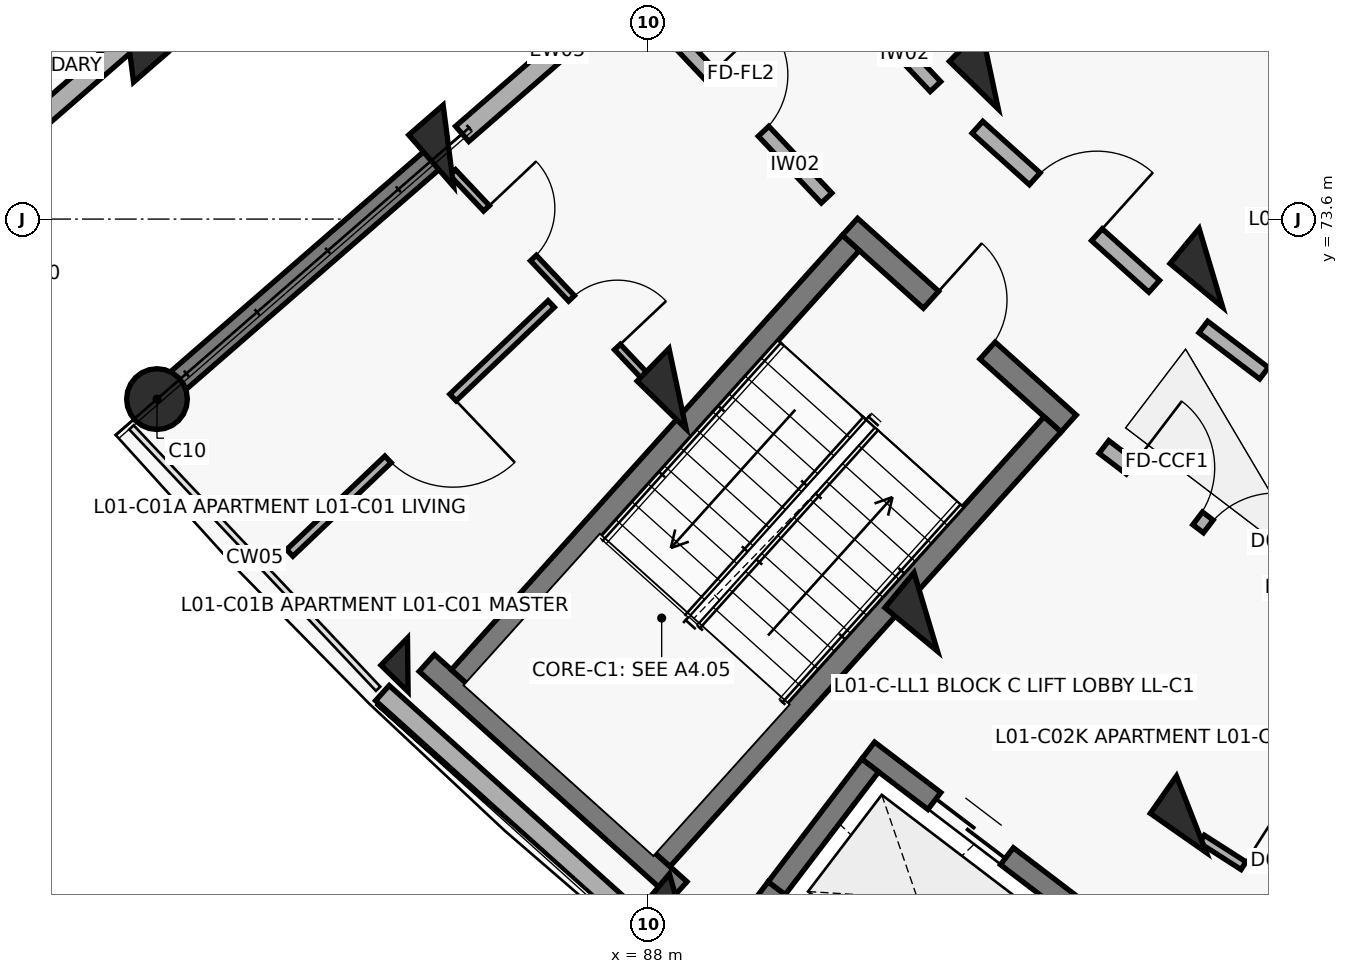
"""IFC4 building model, lengths in metres.
Left out: names, types, materials, properties, quantities, classifications, styles, units other than length and angle.
Written with IfcOpenShell. Run it as: python <this file> out.ifc"""

import sys

from ifc_helpers import new_model, si_unit, direction, frame, frame_2d, origin, origin_2d, place, context, subcontext, project, spatial, rectangle, circle, extrude, element, fill, save


model = new_model("IFC4")
c1 = context("Model", 3, precision=1e-05, world=origin(), true_north=direction((0.0, 1.0)))
c2 = subcontext(c1, "Body", "Model", "MODEL_VIEW")
j1 = project(units=[si_unit("LENGTHUNIT", "METRE"), si_unit("PLANEANGLEUNIT", "RADIAN")], contexts=[c1])
p1 = place(None, origin())
s1 = spatial("IfcSite", under=j1, at=p1, CompositionType="ELEMENT")
p2 = place(p1, origin())
s2 = spatial("IfcBuilding", under=s1, at=p2, CompositionType="ELEMENT")
p3 = place(p2, frame((0.0, 0.0, 4.5)))
s3 = spatial("IfcBuildingStorey", under=s2, at=p3, CompositionType="ELEMENT", Elevation=4.5)
for number, where, z_axis, x_axis in (
    (1, (81.166, 75.938, 0.0), (0.0, 0.0, 1.0), (0.755, 0.656, 0.0)),
    (2, (85.377, 74.564, 0.0), (0.0, 0.0, 1.0), (-0.755, -0.656, 0.0)),
):
    element("IfcColumn", number, at=place(p3, frame(where, z_axis=z_axis, x_axis=x_axis)), inside=s3, PredefinedType="COLUMN", context=c2, shape_type="SweptSolid", body=[
        extrude(rectangle(XDim=0.6, YDim=0.9, at=origin_2d()), origin(), (0.0, 0.0, 1.0), 3.6),
    ])
p4 = place(p3, frame((81.543, 71.231, 0.0), z_axis=(0.0, 0.0, 1.0), x_axis=(-0.754709580223, -0.656059028991, 0.0)))
e3 = element("IfcColumn", 3, at=p4, inside=s3, PredefinedType="COLUMN", context=c2, shape_type="SweptSolid", body=[
    extrude(circle(Radius=0.4, at=origin_2d()), origin(), (0.0, 0.0, 1.0), 3.6),
])
for number, where, z_axis, x_axis in (
    (4, (92.5, 75.576, 0.0), (0.0, 0.0, 1.0), (-0.699, -0.715, 0.0)),
    (5, (88.392, 71.369, 0.0), (0.0, 0.0, 1.0), (-0.699, -0.715, 0.0)),
):
    element("IfcColumn", number, at=place(p3, frame(where, z_axis=z_axis, x_axis=x_axis)), inside=s3, PredefinedType="COLUMN", context=c2, shape_type="SweptSolid", body=[
        extrude(rectangle(XDim=0.6, YDim=0.9, at=origin_2d()), origin(), (0.0, 0.0, 1.0), 3.6),
    ])
p5 = place(p3, frame((84.843, 67.734, 0.0), z_axis=(0.0, 0.0, 1.0), x_axis=(-0.698665066769, -0.715448897181, 0.0)))
e6 = element("IfcColumn", 6, at=p5, inside=s3, PredefinedType="COLUMN", context=c2, shape_type="SweptSolid", body=[
    extrude(rectangle(XDim=0.5, YDim=0.5, at=origin_2d()), origin(), (0.0, 0.0, 1.0), 3.6),
])
for number, where, z_axis, x_axis in (
    (7, (95.409, 72.958, 0.0), (0.0, 0.0, 1.0), (-0.638, -0.77, 0.0)),
    (8, (91.658, 68.43, 0.0), (0.0, 0.0, 1.0), (-0.638, -0.77, 0.0)),
):
    element("IfcColumn", number, at=place(p3, frame(where, z_axis=z_axis, x_axis=x_axis)), inside=s3, PredefinedType="COLUMN", context=c2, shape_type="SweptSolid", body=[
        extrude(rectangle(XDim=0.6, YDim=0.9, at=origin_2d()), origin(), (0.0, 0.0, 1.0), 3.6),
    ])
p6 = place(p3, frame((88.417, 64.518, 0.0), z_axis=(0.0, 0.0, 1.0), x_axis=(-0.637961754089, -0.770068049148, 0.0)))
e9 = element("IfcColumn", 9, at=p6, inside=s3, PredefinedType="COLUMN", context=c2, shape_type="SweptSolid", body=[
    extrude(rectangle(XDim=0.55, YDim=0.8, at=origin_2d()), origin(), (0.0, 0.0, 1.0), 3.6),
])
p7 = place(p3, frame((95.152, 65.768, 0.0), z_axis=(0.0, 0.0, 1.0), x_axis=(-0.573004420611, -0.819552276527, 0.0)))
e10 = element("IfcColumn", 10, at=p7, inside=s3, PredefinedType="COLUMN", context=c2, shape_type="SweptSolid", body=[
    extrude(rectangle(XDim=0.6, YDim=0.9, at=origin_2d()), origin(), (0.0, 0.0, 1.0), 3.6),
])
p8 = place(p3, frame((85.241, 74.446, 0.0), z_axis=(0.0, 0.0, 1.0), x_axis=(-0.754703505217, -0.65606601742, 0.0)))
e11 = element("IfcWall", 11, at=p8, inside=s3, PredefinedType="SHEAR", context=c2, shape_type="SweptSolid", body=[
    extrude(rectangle(XDim=4.72, YDim=0.31, at=frame_2d((2.36, 0.0))), origin(), (0.0, 0.0, 1.0), 3.36),
])
p9 = place(p3, frame((79.234, 74.259, 0.0), z_axis=(0.0, 0.0, 1.0), x_axis=(0.754717680958, 0.656049710044, 0.0)))
e12 = element("IfcWall", 12, at=p9, inside=s3, PredefinedType="SOLIDWALL", context=c2, shape_type="SweptSolid", body=[
    extrude(rectangle(XDim=8.2, YDim=0.265, at=frame_2d((4.1, 0.0))), origin(), (0.0, 0.0, 1.0), 2.58),
])
p10 = place(p9, frame((3.59, 0.0, 0.75)))
e13 = element("IfcOpeningElement", 13, at=p10, cuts=e12, PredefinedType="OPENING", context=c2, shape_type="SweptSolid", body=[
    extrude(rectangle(XDim=1.35, YDim=1.35, at=frame_2d((0.675, 0.675))), frame((0.0, 0.142, 0.0), z_axis=(0.0, -1.0, 0.0), x_axis=(1.0, 0.0, 0.0)), (0.0, 0.0, 1.0), 0.285),
])
p11 = place(p3, frame((84.508, 67.363, 0.0), z_axis=(0.0, 0.0, 1.0), x_axis=(0.743387539862, -0.668860946369, 0.0)))
e14 = element("IfcWall", 14, at=p11, inside=s3, PredefinedType="SOLIDWALL", context=c2, shape_type="SweptSolid", body=[
    extrude(rectangle(XDim=4.809, YDim=0.268, at=frame_2d((2.405, 0.0))), origin(), (0.0, 0.0, 1.0), 2.6),
])
p12 = place(p3, frame((94.82, 77.923, 0.0), z_axis=(0.0, 0.0, 1.0), x_axis=(0.743385092197, -0.668863666751, 0.0)))
e15 = element("IfcWall", 15, at=p12, inside=s3, PredefinedType="SOLIDWALL", context=c2, shape_type="SweptSolid", body=[
    extrude(rectangle(XDim=3.604, YDim=0.245, at=frame_2d((1.802, 0.0))), origin(), (0.0, 0.0, 1.0), 2.6),
])
p13 = place(p12, frame((0.752, 0.0, 0.32)))
e16 = element("IfcOpeningElement", 16, at=p13, cuts=e15, PredefinedType="OPENING", context=c2, shape_type="SweptSolid", body=[
    extrude(rectangle(XDim=2.1, YDim=1.65, at=frame_2d((1.05, 0.825))), frame((0.0, 0.133, 0.0), z_axis=(0.0, -1.0, 0.0), x_axis=(1.0, 0.0, 0.0)), (0.0, 0.0, 1.0), 0.265),
])
p14 = place(p3, frame((91.746, 80.101, 0.0), z_axis=(0.0, 0.0, 1.0), x_axis=(-0.754704866158, -0.656064451862, 0.0)))
e17 = element("IfcWall", 17, at=p14, inside=s3, PredefinedType="SOLIDWALL", context=c2, shape_type="SweptSolid", body=[
    extrude(rectangle(XDim=8.2, YDim=0.265, at=frame_2d((4.1, 0.0))), origin(), (0.0, 0.0, 1.0), 2.58),
])
p15 = place(p14, frame((3.59, 0.0, 0.75)))
e18 = element("IfcOpeningElement", 18, at=p15, cuts=e17, PredefinedType="OPENING", context=c2, shape_type="SweptSolid", body=[
    extrude(rectangle(XDim=1.35, YDim=1.35, at=frame_2d((0.675, 0.675))), frame((0.0, 0.142, 0.0), z_axis=(0.0, -1.0, 0.0), x_axis=(1.0, 0.0, 0.0)), (0.0, 0.0, 1.0), 0.285),
])
p16 = place(p3, frame((90.66, 73.499, 0.0), z_axis=(0.0, 0.0, 1.0), x_axis=(0.743375696158, -0.668874109501, 0.0)))
e19 = element("IfcWall", 19, at=p16, inside=s3, PredefinedType="SHEAR", context=c2, shape_type="SweptSolid", body=[
    extrude(rectangle(XDim=3.87, YDim=0.3, at=frame_2d((1.935, 0.0))), origin(), (0.0, 0.0, 1.0), 3.6),
])
p17 = place(p16, frame((1.435, 0.0, 0.0)))
e20 = element("IfcOpeningElement", 20, at=p17, cuts=e19, PredefinedType="OPENING", context=c2, shape_type="SweptSolid", body=[
    extrude(rectangle(XDim=1.0, YDim=2.15, at=frame_2d((0.5, 1.075))), frame((0.0, 0.16, 0.0), z_axis=(0.0, -1.0, 0.0), x_axis=(1.0, 0.0, 0.0)), (0.0, 0.0, 1.0), 0.32),
])
p18 = place(p3, frame((85.093, 67.76, 0.0), z_axis=(0.0, 0.0, 1.0), x_axis=(0.743372896184, -0.668877221333, 0.0)))
e21 = element("IfcWall", 21, at=p18, inside=s3, PredefinedType="SHEAR", context=c2, shape_type="SweptSolid", body=[
    extrude(rectangle(XDim=4.47, YDim=0.3, at=frame_2d((2.235, 0.0))), origin(), (0.0, 0.0, 1.0), 3.6),
])
p19 = place(p3, frame((90.671, 73.287, 0.0), z_axis=(0.0, 0.0, 1.0), x_axis=(-0.668885797871, -0.743365179038, 0.0)))
e22 = element("IfcWall", 22, at=p19, inside=s3, PredefinedType="SHEAR", context=c2, shape_type="SweptSolid", body=[
    extrude(rectangle(XDim=7.69, YDim=0.3, at=frame_2d((3.845, 0.0))), origin(), (0.0, 0.0, 1.0), 3.6),
])
p20 = place(p3, frame((93.325, 70.899, 0.0), z_axis=(0.0, 0.0, 1.0), x_axis=(-0.668868253964, -0.743380964808, 0.0)))
e23 = element("IfcWall", 23, at=p20, inside=s3, PredefinedType="SHEAR", context=c2, shape_type="SweptSolid", body=[
    extrude(rectangle(XDim=7.69, YDim=0.3, at=frame_2d((3.845, 0.0))), origin(), (0.0, 0.0, 1.0), 3.6),
])
p21 = place(p3, frame((90.899, 66.607, 0.0), z_axis=(0.0, 0.0, 1.0), x_axis=(0.795439986025, -0.606032365994, 0.0)))
e24 = element("IfcWall", 24, at=p21, inside=s3, PredefinedType="SHEAR", context=c2, shape_type="SweptSolid", body=[
    extrude(rectangle(XDim=3.39, YDim=0.28, at=frame_2d((1.695, 0.0))), origin(), (0.0, 0.0, 1.0), 3.6),
])
p22 = place(p21, frame((1.095, 0.0, 0.0)))
e25 = element("IfcOpeningElement", 25, at=p22, cuts=e24, PredefinedType="OPENING", context=c2, shape_type="SweptSolid", body=[
    extrude(rectangle(XDim=1.2, YDim=2.15, at=frame_2d((0.6, 1.075))), frame((0.0, 0.15, 0.0), z_axis=(0.0, -1.0, 0.0), x_axis=(1.0, 0.0, 0.0)), (0.0, 0.0, 1.0), 0.3),
])
p23 = place(p3, frame((89.5, 64.77, 0.0), z_axis=(0.0, 0.0, 1.0), x_axis=(0.795474703455, -0.605986795371, 0.0)))
e26 = element("IfcWall", 26, at=p23, inside=s3, PredefinedType="SHEAR", context=c2, shape_type="SweptSolid", body=[
    extrude(rectangle(XDim=3.39, YDim=0.28, at=frame_2d((1.695, 0.0))), origin(), (0.0, 0.0, 1.0), 3.6),
])
p24 = place(p3, frame((90.926, 66.411, 0.0), z_axis=(0.0, 0.0, 1.0), x_axis=(-0.605948992168, -0.795503500238, 0.0)))
e27 = element("IfcWall", 27, at=p24, inside=s3, PredefinedType="SHEAR", context=c2, shape_type="SweptSolid", body=[
    extrude(rectangle(XDim=2.03, YDim=0.28, at=frame_2d((1.015, 0.0))), origin(), (0.0, 0.0, 1.0), 3.6),
])
p25 = place(p3, frame((87.994, 76.376, 0.0), z_axis=(0.0, 0.0, 1.0), x_axis=(0.686310507227, -0.727308660522, 0.0)))
e28 = element("IfcWall", 28, at=p25, inside=s3, PredefinedType="SOLIDWALL", context=c2, shape_type="SweptSolid", body=[
    extrude(rectangle(XDim=3.436, YDim=0.19, at=frame_2d((1.718, 0.0))), origin(), (0.0, 0.0, 1.0), 2.58),
])
p26 = place(p25, frame((1.208, 0.0, 0.0)))
e29 = element("IfcOpeningElement", 29, at=p26, cuts=e28, PredefinedType="OPENING", context=c2, shape_type="SweptSolid", body=[
    extrude(rectangle(XDim=1.02, YDim=2.15, at=frame_2d((0.51, 1.075))), frame((0.0, 0.105, 0.0), z_axis=(0.0, -1.0, 0.0), x_axis=(1.0, 0.0, 0.0)), (0.0, 0.0, 1.0), 0.21),
])
p27 = place(p3, frame((89.541, 77.721, 0.0), z_axis=(0.0, 0.0, 1.0), x_axis=(0.686344941052, -0.727276166179, 0.0)))
e30 = element("IfcWall", 30, at=p27, inside=s3, PredefinedType="SOLIDWALL", context=c2, shape_type="SweptSolid", body=[
    extrude(rectangle(XDim=3.269, YDim=0.19, at=frame_2d((1.634, 0.0))), origin(), (0.0, 0.0, 1.0), 2.58),
])
p28 = place(p27, frame((1.174, 0.0, 0.0)))
e31 = element("IfcOpeningElement", 31, at=p28, cuts=e30, PredefinedType="OPENING", context=c2, shape_type="SweptSolid", body=[
    extrude(rectangle(XDim=0.92, YDim=2.1, at=frame_2d((0.46, 1.05))), frame((0.0, 0.105, 0.0), z_axis=(0.0, -1.0, 0.0), x_axis=(1.0, 0.0, 0.0)), (0.0, 0.0, 1.0), 0.21),
])
p29 = place(p3, frame((85.432, 74.215, 0.0), z_axis=(0.0, 0.0, 1.0), x_axis=(0.686301674417, -0.727316995327, 0.0)))
e32 = element("IfcWall", 32, at=p29, inside=s3, PredefinedType="PARTITIONING", context=c2, shape_type="SweptSolid", body=[
    extrude(rectangle(XDim=3.81, YDim=0.105, at=frame_2d((1.905, 0.0))), origin(), (0.0, 0.0, 1.0), 2.58),
])
p30 = place(p29, frame((0.65, 0.0, 0.0)))
e33 = element("IfcOpeningElement", 33, at=p30, cuts=e32, PredefinedType="OPENING", context=c2, shape_type="SweptSolid", body=[
    extrude(rectangle(XDim=0.9, YDim=2.1, at=frame_2d((0.45, 1.05))), frame((0.0, 0.062, 0.0), z_axis=(0.0, -1.0, 0.0), x_axis=(1.0, 0.0, 0.0)), (0.0, 0.0, 1.0), 0.125),
])
p31 = place(p29, frame((2.28, 0.0, 0.0)))
e34 = element("IfcOpeningElement", 34, at=p31, cuts=e32, PredefinedType="OPENING", context=c2, shape_type="SweptSolid", body=[
    extrude(rectangle(XDim=0.88, YDim=2.1, at=frame_2d((0.44, 1.05))), frame((0.0, 0.062, 0.0), z_axis=(0.0, -1.0, 0.0), x_axis=(1.0, 0.0, 0.0)), (0.0, 0.0, 1.0), 0.125),
])
p32 = place(p3, frame((86.729, 72.483, 0.0), z_axis=(0.0, 0.0, 1.0), x_axis=(-0.72416604425, -0.689625652332, 0.0)))
e35 = element("IfcWall", 35, at=p32, inside=s3, PredefinedType="PARTITIONING", context=c2, shape_type="SweptSolid", body=[
    extrude(rectangle(XDim=4.75, YDim=0.12, at=frame_2d((2.375, 0.0))), origin(), (0.0, 0.0, 1.0), 2.58),
])
p33 = place(p32, frame((1.785, 0.0, 0.0)))
e36 = element("IfcOpeningElement", 36, at=p33, cuts=e35, PredefinedType="OPENING", context=c2, shape_type="SweptSolid", body=[
    extrude(rectangle(XDim=1.18, YDim=2.1, at=frame_2d((0.59, 1.05))), frame((0.0, 0.07, 0.0), z_axis=(0.0, -1.0, 0.0), x_axis=(1.0, 0.0, 0.0)), (0.0, 0.0, 1.0), 0.14),
])
p34 = place(p3, frame((92.337, 74.808, 0.0), z_axis=(0.0, 0.0, 1.0), x_axis=(0.743348465558, -0.668904371904, 0.0)))
e37 = element("IfcWall", 37, at=p34, inside=s3, PredefinedType="SOLIDWALL", context=c2, shape_type="SweptSolid", body=[
    extrude(rectangle(XDim=3.129, YDim=0.21, at=frame_2d((1.564, 0.0))), origin(), (0.0, 0.0, 1.0), 2.58),
])
p35 = place(p34, frame((1.014, 0.0, 0.0)))
e38 = element("IfcOpeningElement", 38, at=p35, cuts=e37, PredefinedType="OPENING", context=c2, shape_type="SweptSolid", body=[
    extrude(rectangle(XDim=1.1, YDim=2.15, at=frame_2d((0.55, 1.075))), frame((0.0, 0.115, 0.0), z_axis=(0.0, -1.0, 0.0), x_axis=(1.0, 0.0, 0.0)), (0.0, 0.0, 1.0), 0.23),
])
p36 = place(p3, frame((94.001, 70.602, 0.0), z_axis=(0.0, 0.0, 1.0), x_axis=(0.795498026433, -0.605956178235, 0.0)))
e39 = element("IfcWall", 39, at=p36, inside=s3, PredefinedType="SOLIDWALL", context=c2, shape_type="SweptSolid", body=[
    extrude(rectangle(XDim=3.296, YDim=0.21, at=frame_2d((1.648, 0.0))), origin(), (0.0, 0.0, 1.0), 2.58),
])
p37 = place(p36, frame((0.45, 0.0, 0.0)))
e40 = element("IfcOpeningElement", 40, at=p37, cuts=e39, PredefinedType="OPENING", context=c2, shape_type="SweptSolid", body=[
    extrude(rectangle(XDim=1.1, YDim=2.15, at=frame_2d((0.55, 1.075))), frame((0.0, 0.115, 0.0), z_axis=(0.0, -1.0, 0.0), x_axis=(1.0, 0.0, 0.0)), (0.0, 0.0, 1.0), 0.23),
])
p38 = place(p36, frame((1.726, 0.0, 0.0)))
e41 = element("IfcOpeningElement", 41, at=p38, cuts=e39, PredefinedType="OPENING", context=c2, shape_type="SweptSolid", body=[
    extrude(rectangle(XDim=1.12, YDim=2.15, at=frame_2d((0.56, 1.075))), frame((0.0, 0.115, 0.0), z_axis=(0.0, -1.0, 0.0), x_axis=(1.0, 0.0, 0.0)), (0.0, 0.0, 1.0), 0.23),
])
p39 = place(p3, frame((95.309, 72.18, 0.0), z_axis=(0.0, 0.0, 1.0), x_axis=(0.795463961918, -0.606000895453, 0.0)))
e42 = element("IfcWall", 42, at=p39, inside=s3, PredefinedType="SOLIDWALL", context=c2, shape_type="SweptSolid", body=[
    extrude(rectangle(XDim=3.129, YDim=0.19, at=frame_2d((1.564, 0.0))), origin(), (0.0, 0.0, 1.0), 2.58),
])
p40 = place(p39, frame((1.004, 0.0, 0.0)))
e43 = element("IfcOpeningElement", 43, at=p40, cuts=e42, PredefinedType="OPENING", context=c2, shape_type="SweptSolid", body=[
    extrude(rectangle(XDim=1.12, YDim=2.15, at=frame_2d((0.56, 1.075))), frame((0.0, 0.105, 0.0), z_axis=(0.0, -1.0, 0.0), x_axis=(1.0, 0.0, 0.0)), (0.0, 0.0, 1.0), 0.21),
])
p41 = place(p3, frame((95.291, 65.442, 0.0), z_axis=(0.0, 0.0, 1.0), x_axis=(0.842267908806, -0.539059152409, 0.0)))
e44 = element("IfcWall", 44, at=p41, inside=s3, PredefinedType="PARTITIONING", context=c2, shape_type="SweptSolid", body=[
    extrude(rectangle(XDim=3.809, YDim=0.12, at=frame_2d((1.905, 0.0))), origin(), (0.0, 0.0, 1.0), 2.58),
])
p42 = place(p41, frame((0.65, 0.0, 0.0)))
e45 = element("IfcOpeningElement", 45, at=p42, cuts=e44, PredefinedType="OPENING", context=c2, shape_type="SweptSolid", body=[
    extrude(rectangle(XDim=0.9, YDim=2.1, at=frame_2d((0.45, 1.05))), frame((0.0, 0.07, 0.0), z_axis=(0.0, -1.0, 0.0), x_axis=(1.0, 0.0, 0.0)), (0.0, 0.0, 1.0), 0.14),
])
p43 = place(p41, frame((2.28, 0.0, 0.0)))
e46 = element("IfcOpeningElement", 46, at=p43, cuts=e44, PredefinedType="OPENING", context=c2, shape_type="SweptSolid", body=[
    extrude(rectangle(XDim=0.88, YDim=2.1, at=frame_2d((0.44, 1.05))), frame((0.0, 0.07, 0.0), z_axis=(0.0, -1.0, 0.0), x_axis=(1.0, 0.0, 0.0)), (0.0, 0.0, 1.0), 0.14),
])
p44 = place(p17, origin())
e47 = element("IfcDoor", 47, at=p44, inside=s3, OperationType="SINGLE_SWING_LEFT", PredefinedType="DOOR", context=c2, shape_type="SweptSolid", body=[
    extrude(rectangle(XDim=1.0, YDim=2.15, at=frame_2d((0.5, 1.075))), frame((0.0, 0.025, 0.0), z_axis=(0.0, -1.0, 0.0), x_axis=(1.0, 0.0, 0.0)), (0.0, 0.0, 1.0), 0.05),
])
fill(e20, e47)
p45 = place(p22, origin())
e48 = element("IfcDoor", 48, at=p45, inside=s3, OperationType="DOUBLE_DOOR_SLIDING", PredefinedType="DOOR", context=c2, shape_type="SweptSolid", body=[
    extrude(rectangle(XDim=1.2, YDim=2.15, at=frame_2d((0.6, 1.075))), frame((0.0, 0.025, 0.0), z_axis=(0.0, -1.0, 0.0), x_axis=(1.0, 0.0, 0.0)), (0.0, 0.0, 1.0), 0.05),
])
fill(e25, e48)
p46 = place(p26, origin())
e49 = element("IfcDoor", 49, at=p46, inside=s3, OperationType="SINGLE_SWING_LEFT", PredefinedType="DOOR", context=c2, shape_type="SweptSolid", body=[
    extrude(rectangle(XDim=1.02, YDim=2.15, at=frame_2d((0.51, 1.075))), frame((0.0, 0.025, 0.0), z_axis=(0.0, -1.0, 0.0), x_axis=(1.0, 0.0, 0.0)), (0.0, 0.0, 1.0), 0.05),
])
fill(e29, e49)
p47 = place(p30, origin())
e50 = element("IfcDoor", 50, at=p47, inside=s3, OperationType="SINGLE_SWING_LEFT", PredefinedType="DOOR", context=c2, shape_type="SweptSolid", body=[
    extrude(rectangle(XDim=0.9, YDim=2.1, at=frame_2d((0.45, 1.05))), frame((0.0, 0.025, 0.0), z_axis=(0.0, -1.0, 0.0), x_axis=(1.0, 0.0, 0.0)), (0.0, 0.0, 1.0), 0.05),
])
fill(e33, e50)
p48 = place(p31, origin())
e51 = element("IfcDoor", 51, at=p48, inside=s3, OperationType="SINGLE_SWING_RIGHT", PredefinedType="DOOR", context=c2, shape_type="SweptSolid", body=[
    extrude(rectangle(XDim=0.88, YDim=2.1, at=frame_2d((0.44, 1.05))), frame((0.0, 0.025, 0.0), z_axis=(0.0, -1.0, 0.0), x_axis=(1.0, 0.0, 0.0)), (0.0, 0.0, 1.0), 0.05),
])
fill(e34, e51)
p49 = place(p33, origin())
e52 = element("IfcDoor", 52, at=p49, inside=s3, OperationType="SINGLE_SWING_LEFT", PredefinedType="DOOR", context=c2, shape_type="SweptSolid", body=[
    extrude(rectangle(XDim=1.18, YDim=2.1, at=frame_2d((0.59, 1.05))), frame((0.0, 0.025, 0.0), z_axis=(0.0, -1.0, 0.0), x_axis=(1.0, 0.0, 0.0)), (0.0, 0.0, 1.0), 0.05),
])
fill(e36, e52)
p50 = place(p35, origin())
e53 = element("IfcDoor", 53, at=p50, inside=s3, OperationType="SINGLE_SWING_RIGHT", PredefinedType="DOOR", context=c2, shape_type="SweptSolid", body=[
    extrude(rectangle(XDim=1.1, YDim=2.15, at=frame_2d((0.55, 1.075))), frame((0.0, 0.025, 0.0), z_axis=(0.0, -1.0, 0.0), x_axis=(1.0, 0.0, 0.0)), (0.0, 0.0, 1.0), 0.05),
])
fill(e38, e53)
p51 = place(p37, origin())
e54 = element("IfcDoor", 54, at=p51, inside=s3, OperationType="SINGLE_SWING_LEFT", PredefinedType="DOOR", context=c2, shape_type="SweptSolid", body=[
    extrude(rectangle(XDim=1.1, YDim=2.15, at=frame_2d((0.55, 1.075))), frame((0.0, 0.025, 0.0), z_axis=(0.0, -1.0, 0.0), x_axis=(1.0, 0.0, 0.0)), (0.0, 0.0, 1.0), 0.05),
])
fill(e40, e54)
p52 = place(p38, origin())
e55 = element("IfcDoor", 55, at=p52, inside=s3, OperationType="SINGLE_SWING_RIGHT", PredefinedType="DOOR", context=c2, shape_type="SweptSolid", body=[
    extrude(rectangle(XDim=1.12, YDim=2.15, at=frame_2d((0.56, 1.075))), frame((0.0, 0.025, 0.0), z_axis=(0.0, -1.0, 0.0), x_axis=(1.0, 0.0, 0.0)), (0.0, 0.0, 1.0), 0.05),
])
fill(e41, e55)
p53 = place(p40, origin())
e56 = element("IfcDoor", 56, at=p53, inside=s3, OperationType="SINGLE_SWING_LEFT", PredefinedType="DOOR", context=c2, shape_type="SweptSolid", body=[
    extrude(rectangle(XDim=1.12, YDim=2.15, at=frame_2d((0.56, 1.075))), frame((0.0, 0.025, 0.0), z_axis=(0.0, -1.0, 0.0), x_axis=(1.0, 0.0, 0.0)), (0.0, 0.0, 1.0), 0.05),
])
fill(e43, e56)
p54 = place(p42, origin())
e57 = element("IfcDoor", 57, at=p54, inside=s3, OperationType="SINGLE_SWING_LEFT", PredefinedType="DOOR", context=c2, shape_type="SweptSolid", body=[
    extrude(rectangle(XDim=0.9, YDim=2.1, at=frame_2d((0.45, 1.05))), frame((0.0, 0.025, 0.0), z_axis=(0.0, -1.0, 0.0), x_axis=(1.0, 0.0, 0.0)), (0.0, 0.0, 1.0), 0.05),
])
fill(e45, e57)
save(model, sys.argv[1])
